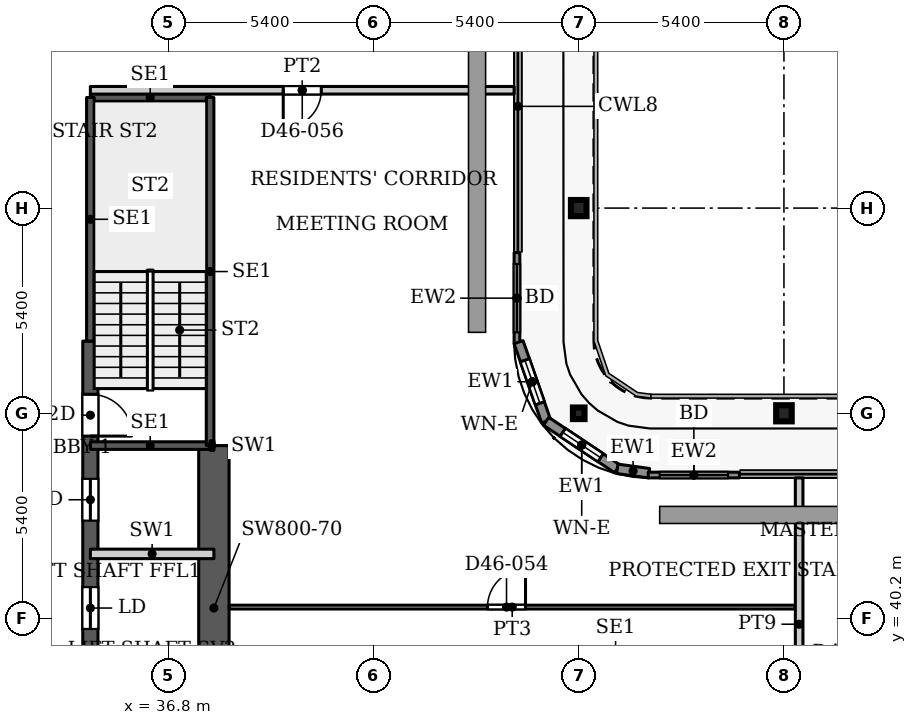
"""IFC4 building model, lengths in metres.
Left out: names, types, materials, properties, quantities, classifications, styles, units other than length and angle.
Written with IfcOpenShell. Run it as: python <this file> out.ifc"""

import sys

from ifc_helpers import new_model, si_unit, direction, frame, frame_2d, origin, origin_2d, place, context, subcontext, project, spatial, rectangle, hollow_rectangle, i_section, extrude, source, transform, mapped, element, fill, save


model = new_model("IFC4")
c1 = context("Model", 3, precision=1e-05, world=origin(), true_north=direction((0.0, 1.0)))
c2 = subcontext(c1, "Body", "Model", "MODEL_VIEW")
j1 = project(units=[si_unit("LENGTHUNIT", "METRE"), si_unit("PLANEANGLEUNIT", "RADIAN")], contexts=[c1])
p1 = place(None, origin())
s1 = spatial("IfcSite", under=j1, at=p1, CompositionType="ELEMENT")
p2 = place(p1, origin())
s2 = spatial("IfcBuilding", under=s1, at=p2, CompositionType="ELEMENT")
p3 = place(p2, frame((0.0, 0.0, 199.4)))
s3 = spatial("IfcBuildingStorey", under=s2, at=p3, CompositionType="ELEMENT", Elevation=199.4)
for number, where, z_axis, x_axis in (
    (1, (53.0, 45.6, 0.0), (0.0, 0.0, 1.0), (1.0, 0.0, 0.0)),
    (2, (47.6, 51.0, 0.0), (0.0, 0.0, 1.0), (1.0, 0.0, 0.0)),
):
    element("IfcColumn", number, at=place(p3, frame(where, z_axis=z_axis, x_axis=x_axis)), inside=s3, PredefinedType="COLUMN", context=c2, shape_type="SweptSolid", body=[
        extrude(i_section(OverallWidth=0.409, OverallDepth=0.425, WebThickness=0.033, FlangeThickness=0.052, FilletRadius=0.013, at=origin_2d()), origin(), (0.0, 0.0, 1.0), 3.9),
    ])
p4 = place(p3, frame((47.6, 45.6, 0.0), z_axis=(0.0, 0.0, 1.0), x_axis=(1.0, 0.0, 0.0)))
e3 = element("IfcColumn", 3, at=p4, inside=s3, PredefinedType="COLUMN", context=c2, shape_type="SweptSolid", body=[
    extrude(hollow_rectangle(XDim=0.305, YDim=0.305, WallThickness=0.016, InnerFilletRadius=0.016, OuterFilletRadius=0.032, at=origin_2d()), origin(), (0.0, 0.0, 1.0), 3.9),
])
p5 = place(p3, frame((34.75, 29.05, 0.0), z_axis=(0.0, 0.0, 1.0), x_axis=(0.0, 1.0, 0.0)))
e4 = element("IfcWall", 4, at=p5, inside=s3, PredefinedType="SHEAR", context=c2, shape_type="SweptSolid", body=[
    extrude(rectangle(XDim=18.45, YDim=0.4, at=frame_2d((9.225, 0.0))), origin(), (0.0, 0.0, 1.0), 3.9),
])
p6 = place(p5, frame((8.025, 0.0, 0.0)))
e5 = element("IfcOpeningElement", 5, at=p6, cuts=e4, PredefinedType="OPENING", context=c2, shape_type="SweptSolid", body=[
    extrude(rectangle(XDim=1.1, YDim=2.2, at=frame_2d((0.55, 1.1))), frame((0.0, 0.21, 0.0), z_axis=(0.0, -1.0, 0.0), x_axis=(1.0, 0.0, 0.0)), (0.0, 0.0, 1.0), 0.42),
])
p7 = place(p5, frame((10.875, 0.0, 0.0)))
e6 = element("IfcOpeningElement", 6, at=p7, cuts=e4, PredefinedType="OPENING", context=c2, shape_type="SweptSolid", body=[
    extrude(rectangle(XDim=1.1, YDim=2.2, at=frame_2d((0.55, 1.1))), frame((0.0, 0.21, 0.0), z_axis=(0.0, -1.0, 0.0), x_axis=(1.0, 0.0, 0.0)), (0.0, 0.0, 1.0), 0.42),
])
p8 = place(p5, frame((13.725, 0.0, 0.0)))
e7 = element("IfcOpeningElement", 7, at=p8, cuts=e4, PredefinedType="OPENING", context=c2, shape_type="SweptSolid", body=[
    extrude(rectangle(XDim=1.1, YDim=2.2, at=frame_2d((0.55, 1.1))), frame((0.0, 0.21, 0.0), z_axis=(0.0, -1.0, 0.0), x_axis=(1.0, 0.0, 0.0)), (0.0, 0.0, 1.0), 0.42),
])
p9 = place(p5, frame((15.95, 0.0, 0.0)))
e8 = element("IfcOpeningElement", 8, at=p9, cuts=e4, PredefinedType="OPENING", context=c2, shape_type="SweptSolid", body=[
    extrude(rectangle(XDim=1.1, YDim=2.2, at=frame_2d((0.55, 1.1))), frame((0.0, 0.21, 0.0), z_axis=(0.0, -1.0, 0.0), x_axis=(1.0, 0.0, 0.0)), (0.0, 0.0, 1.0), 0.42),
])
p10 = place(p3, frame((38.0, 36.2, 0.0), z_axis=(0.0, 0.0, 1.0), x_axis=(0.0, 1.0, 0.0)))
e9 = element("IfcWall", 9, at=p10, inside=s3, PredefinedType="SHEAR", context=c2, shape_type="SweptSolid", body=[
    extrude(rectangle(XDim=8.55, YDim=0.8, at=frame_2d((4.275, 0.0))), origin(), (0.0, 0.0, 1.0), 3.9),
])
p11 = place(p3, frame((45.975, 49.83, 0.0), z_axis=(0.0, 0.0, 1.0), x_axis=(0.0, -1.0, 0.0)))
e10 = element("IfcWall", 10, at=p11, inside=s3, PredefinedType="SOLIDWALL", context=c2, shape_type="SweptSolid", body=[
    extrude(rectangle(XDim=2.4, YDim=0.15, at=frame_2d((1.2, 0.0))), origin(), (0.0, 0.0, 1.0), 3.75),
])
p12 = place(p11, frame((0.3, 0.0, 0.0)))
e11 = element("IfcOpeningElement", 11, at=p12, cuts=e10, PredefinedType="OPENING", context=c2, shape_type="SweptSolid", body=[
    extrude(rectangle(XDim=1.8, YDim=2.4, at=frame_2d((0.9, 1.2))), frame((0.0, 0.085, 0.0), z_axis=(0.0, -1.0, 0.0), x_axis=(1.0, 0.0, 0.0)), (0.0, 0.0, 1.0), 0.17),
])
p13 = place(p3, frame((46.018, 47.471, 0.0), z_axis=(0.0, 0.0, 1.0), x_axis=(0.328791208903, -0.944402637093, 0.0)))
e12 = element("IfcWall", 12, at=p13, inside=s3, PredefinedType="SOLIDWALL", context=c2, shape_type="SweptSolid", body=[
    extrude(rectangle(XDim=2.205, YDim=0.25, at=frame_2d((1.102, 0.0))), origin(), (0.0, 0.0, 1.0), 3.75),
])
p14 = place(p13, frame((0.503, 0.0, 0.6)))
e13 = element("IfcOpeningElement", 13, at=p14, cuts=e12, PredefinedType="OPENING", context=c2, shape_type="SweptSolid", body=[
    extrude(rectangle(XDim=1.2, YDim=2.1, at=frame_2d((0.6, 1.05))), frame((0.0, 0.135, 0.0), z_axis=(0.0, -1.0, 0.0), x_axis=(1.0, 0.0, 0.0)), (0.0, 0.0, 1.0), 0.27),
])
p15 = place(p3, frame((46.743, 45.389, 0.0), z_axis=(0.0, 0.0, 1.0), x_axis=(0.831449265529, -0.555600682912, 0.0)))
e14 = element("IfcWall", 14, at=p15, inside=s3, PredefinedType="SOLIDWALL", context=c2, shape_type="SweptSolid", body=[
    extrude(rectangle(XDim=2.251, YDim=0.25, at=frame_2d((1.126, 0.0))), origin(), (0.0, 0.0, 1.0), 3.75),
])
p16 = place(p15, frame((0.525, 0.0, 0.6)))
e15 = element("IfcOpeningElement", 15, at=p16, cuts=e14, PredefinedType="OPENING", context=c2, shape_type="SweptSolid", body=[
    extrude(rectangle(XDim=1.2, YDim=2.1, at=frame_2d((0.6, 1.05))), frame((0.0, 0.135, 0.0), z_axis=(0.0, -1.0, 0.0), x_axis=(1.0, 0.0, 0.0)), (0.0, 0.0, 1.0), 0.27),
])
p17 = place(p3, frame((48.615, 44.138, 0.0), z_axis=(0.0, 0.0, 1.0), x_axis=(0.990741504246, -0.135761819977, 0.0)))
e16 = element("IfcWall", 16, at=p17, inside=s3, PredefinedType="SOLIDWALL", context=c2, shape_type="SweptSolid", body=[
    extrude(rectangle(XDim=0.84, YDim=0.25, at=frame_2d((0.42, 0.0))), origin(), (0.0, 0.0, 1.0), 3.75),
])
p18 = place(p3, frame((49.43, 43.975, 0.0), z_axis=(0.0, 0.0, 1.0), x_axis=(1.0, 0.0, 0.0)))
e17 = element("IfcWall", 17, at=p18, inside=s3, PredefinedType="SOLIDWALL", context=c2, shape_type="SweptSolid", body=[
    extrude(rectangle(XDim=2.4, YDim=0.15, at=frame_2d((1.2, 0.0))), origin(), (0.0, 0.0, 1.0), 3.75),
])
p19 = place(p18, frame((0.3, 0.0, 0.0)))
e18 = element("IfcOpeningElement", 18, at=p19, cuts=e17, PredefinedType="OPENING", context=c2, shape_type="SweptSolid", body=[
    extrude(rectangle(XDim=1.8, YDim=2.4, at=frame_2d((0.9, 1.2))), frame((0.0, 0.085, 0.0), z_axis=(0.0, -1.0, 0.0), x_axis=(1.0, 0.0, 0.0)), (0.0, 0.0, 1.0), 0.17),
])
for number, where, z_axis, x_axis in (
    (19, (34.75, 44.75, 0.0), (0.0, 0.0, 1.0), (1.0, 0.0, 0.0)),
    (20, (34.75, 53.91, 0.0), (0.0, 0.0, 1.0), (1.0, 0.0, 0.0)),
):
    element("IfcWall", number, at=place(p3, frame(where, z_axis=z_axis, x_axis=x_axis)), inside=s3, PredefinedType="SHEAR", context=c2, shape_type="SweptSolid", body=[
        extrude(rectangle(XDim=3.15, YDim=0.2, at=frame_2d((1.575, 0.0))), origin(), (0.0, 0.0, 1.0), 3.9),
    ])
p20 = place(p3, frame((34.75, 47.5, 0.0), z_axis=(0.0, 0.0, 1.0), x_axis=(0.0, 1.0, 0.0)))
e21 = element("IfcWall", 21, at=p20, inside=s3, PredefinedType="SHEAR", context=c2, shape_type="SweptSolid", body=[
    extrude(rectangle(XDim=6.41, YDim=0.2, at=frame_2d((3.205, 0.0))), origin(), (0.0, 0.0, 1.0), 3.9),
])
p21 = place(p3, frame((37.9, 44.75, 0.0), z_axis=(0.0, 0.0, 1.0), x_axis=(0.0, 1.0, 0.0)))
e22 = element("IfcWall", 22, at=p21, inside=s3, PredefinedType="SHEAR", context=c2, shape_type="SweptSolid", body=[
    extrude(rectangle(XDim=9.16, YDim=0.2, at=frame_2d((4.58, 0.0))), origin(), (0.0, 0.0, 1.0), 3.9),
])
p22 = place(p3, frame((34.75, 41.9, 0.0), z_axis=(0.0, 0.0, 1.0), x_axis=(1.0, 0.0, 0.0)))
e23 = element("IfcWall", 23, at=p22, inside=s3, PredefinedType="PARTITIONING", context=c2, shape_type="SweptSolid", body=[
    extrude(rectangle(XDim=3.25, YDim=0.25, at=frame_2d((1.625, 0.0))), origin(), (0.0, 0.0, 1.0), 3.9),
])
p23 = place(p3, frame((37.9, 44.75, 0.0), z_axis=(0.0, 0.0, 1.0), x_axis=(1.0, 0.0, 0.0)))
e24 = element("IfcWall", 24, at=p23, inside=s3, PredefinedType="PARTITIONING", context=c2, shape_type="SweptSolid", body=[
    extrude(rectangle(XDim=0.1, YDim=0.25, at=frame_2d((0.05, 0.0))), origin(), (0.0, 0.0, 1.0), 3.9),
])
p24 = place(p3, frame((34.75, 54.1, 0.0), z_axis=(0.0, 0.0, 1.0), x_axis=(1.0, 0.0, 0.0)))
e25 = element("IfcWall", 25, at=p24, inside=s3, PredefinedType="PARTITIONING", context=c2, shape_type="SweptSolid", body=[
    extrude(rectangle(XDim=11.15, YDim=0.2, at=frame_2d((5.575, 0.0))), origin(), (0.0, 0.0, 1.0), 3.6),
])
p25 = place(p24, frame((5.075, 0.0, 0.0)))
e26 = element("IfcOpeningElement", 26, at=p25, cuts=e25, PredefinedType="OPENING", context=c2, shape_type="SweptSolid", body=[
    extrude(rectangle(XDim=1.0, YDim=2.1, at=frame_2d((0.5, 1.05))), frame((0.0, 0.11, 0.0), z_axis=(0.0, -1.0, 0.0), x_axis=(1.0, 0.0, 0.0)), (0.0, 0.0, 1.0), 0.22),
])
p26 = place(p3, frame((38.399, 40.5, 0.0), z_axis=(0.0, 0.0, 1.0), x_axis=(1.0, 0.0, 0.0)))
e27 = element("IfcWall", 27, at=p26, inside=s3, PredefinedType="PARTITIONING", context=c2, shape_type="SweptSolid", body=[
    extrude(rectangle(XDim=14.901, YDim=0.1, at=frame_2d((7.451, 0.0))), origin(), (0.0, 0.0, 1.0), 3.6),
])
p27 = place(p26, frame((6.801, 0.0, 0.0)))
e28 = element("IfcOpeningElement", 28, at=p27, cuts=e27, PredefinedType="OPENING", context=c2, shape_type="SweptSolid", body=[
    extrude(rectangle(XDim=1.0, YDim=2.1, at=frame_2d((0.5, 1.05))), frame((0.0, 0.06, 0.0), z_axis=(0.0, -1.0, 0.0), x_axis=(1.0, 0.0, 0.0)), (0.0, 0.0, 1.0), 0.12),
])
p28 = place(p3, frame((53.4, 36.199, 0.0), z_axis=(0.0, 0.0, 1.0), x_axis=(0.0, 1.0, 0.0)))
e29 = element("IfcWall", 29, at=p28, inside=s3, PredefinedType="PARTITIONING", context=c2, shape_type="SweptSolid", body=[
    extrude(rectangle(XDim=7.701, YDim=0.2, at=frame_2d((3.851, 0.0))), origin(), (0.0, 0.0, 1.0), 3.6),
])
m1 = source(origin(), c2, "Body", "SweptSolid", [
    extrude(rectangle(XDim=1.8, YDim=2.4, at=frame_2d((0.9, 1.2))), frame((0.0, 0.025, 0.0), z_axis=(0.0, -1.0, 0.0), x_axis=(1.0, 0.0, 0.0)), (0.0, 0.0, 1.0), 0.05),
])
p29 = place(p12, origin())
e30 = element("IfcDoor", 30, at=p29, inside=s3, OperationType="SLIDING_TO_LEFT", PredefinedType="DOOR", context=c2, shape_type="MappedRepresentation", body=[
    mapped(m1, transform((0.0, 0.0, 0.0), x_axis=(1.0, 0.0, 0.0), y_axis=(0.0, 1.0, 0.0), z_axis=(0.0, 0.0, 1.0), scale=1.0)),
])
fill(e11, e30)
m2 = source(origin(), c2, "Body", "SweptSolid", [
    extrude(rectangle(XDim=1.2, YDim=2.1, at=frame_2d((0.6, 1.05))), frame((0.0, 0.03, 0.0), z_axis=(0.0, -1.0, 0.0), x_axis=(1.0, 0.0, 0.0)), (0.0, 0.0, 1.0), 0.06),
])
p30 = place(p14, origin())
e31 = element("IfcWindow", 31, at=p30, inside=s3, PartitioningType="SINGLE_PANEL", PredefinedType="WINDOW", context=c2, shape_type="MappedRepresentation", body=[
    mapped(m2, transform((0.0, 0.0, 0.0), x_axis=(1.0, 0.0, 0.0), y_axis=(0.0, 1.0, 0.0), z_axis=(0.0, 0.0, 1.0), scale=1.0)),
])
fill(e13, e31)
p31 = place(p16, origin())
e32 = element("IfcWindow", 32, at=p31, inside=s3, PartitioningType="SINGLE_PANEL", PredefinedType="WINDOW", context=c2, shape_type="MappedRepresentation", body=[
    mapped(m2, transform((0.0, 0.0, 0.0), x_axis=(1.0, 0.0, 0.0), y_axis=(0.0, 1.0, 0.0), z_axis=(0.0, 0.0, 1.0), scale=1.0)),
])
fill(e15, e32)
p32 = place(p19, origin())
e33 = element("IfcDoor", 33, at=p32, inside=s3, OperationType="SLIDING_TO_LEFT", PredefinedType="DOOR", context=c2, shape_type="MappedRepresentation", body=[
    mapped(m1, transform((0.0, 0.0, 0.0), x_axis=(1.0, 0.0, 0.0), y_axis=(0.0, 1.0, 0.0), z_axis=(0.0, 0.0, 1.0), scale=1.0)),
])
fill(e18, e33)
m3 = source(origin(), c2, "Body", "SweptSolid", [
    extrude(rectangle(XDim=1.1, YDim=2.2, at=frame_2d((0.55, 1.1))), frame((0.0, 0.025, 0.0), z_axis=(0.0, -1.0, 0.0), x_axis=(1.0, 0.0, 0.0)), (0.0, 0.0, 1.0), 0.05),
])
p33 = place(p7, origin())
e34 = element("IfcDoor", 34, at=p33, inside=s3, OperationType="SLIDING_TO_LEFT", PredefinedType="DOOR", context=c2, shape_type="MappedRepresentation", body=[
    mapped(m3, transform((0.0, 0.0, 0.0), x_axis=(1.0, 0.0, 0.0), y_axis=(0.0, 1.0, 0.0), z_axis=(0.0, 0.0, 1.0), scale=1.0)),
])
fill(e6, e34)
p34 = place(p8, origin())
e35 = element("IfcDoor", 35, at=p34, inside=s3, OperationType="SLIDING_TO_LEFT", PredefinedType="DOOR", context=c2, shape_type="MappedRepresentation", body=[
    mapped(m3, transform((0.0, 0.0, 0.0), x_axis=(1.0, 0.0, 0.0), y_axis=(0.0, 1.0, 0.0), z_axis=(0.0, 0.0, 1.0), scale=1.0)),
])
fill(e7, e35)
m4 = source(origin(), c2, "Body", "SweptSolid", [
    extrude(rectangle(XDim=1.1, YDim=2.2, at=frame_2d((0.55, 1.1))), frame((0.0, 0.025, 0.0), z_axis=(0.0, -1.0, 0.0), x_axis=(1.0, 0.0, 0.0)), (0.0, 0.0, 1.0), 0.05),
])
p35 = place(p9, origin())
e36 = element("IfcDoor", 36, at=p35, inside=s3, OperationType="SINGLE_SWING_RIGHT", PredefinedType="DOOR", context=c2, shape_type="MappedRepresentation", body=[
    mapped(m4, transform((0.0, 0.0, 0.0), x_axis=(1.0, 0.0, 0.0), y_axis=(0.0, 1.0, 0.0), z_axis=(0.0, 0.0, 1.0), scale=1.0)),
])
fill(e8, e36)
m5 = source(origin(), c2, "Body", "SweptSolid", [
    extrude(rectangle(XDim=1.0, YDim=2.1, at=frame_2d((0.5, 1.05))), frame((0.0, 0.025, 0.0), z_axis=(0.0, -1.0, 0.0), x_axis=(1.0, 0.0, 0.0)), (0.0, 0.0, 1.0), 0.05),
])
p36 = place(p27, origin())
e37 = element("IfcDoor", 37, at=p36, inside=s3, OperationType="SINGLE_SWING_LEFT", PredefinedType="DOOR", context=c2, shape_type="MappedRepresentation", body=[
    mapped(m5, transform((0.0, 0.0, 0.0), x_axis=(1.0, 0.0, 0.0), y_axis=(0.0, 1.0, 0.0), z_axis=(0.0, 0.0, 1.0), scale=1.0)),
])
fill(e28, e37)
m6 = source(origin(), c2, "Body", "SweptSolid", [
    extrude(rectangle(XDim=1.0, YDim=2.1, at=frame_2d((0.5, 1.05))), frame((0.0, 0.025, 0.0), z_axis=(0.0, -1.0, 0.0), x_axis=(1.0, 0.0, 0.0)), (0.0, 0.0, 1.0), 0.05),
])
p37 = place(p25, origin())
e38 = element("IfcDoor", 38, at=p37, inside=s3, OperationType="SINGLE_SWING_RIGHT", PredefinedType="DOOR", context=c2, shape_type="MappedRepresentation", body=[
    mapped(m6, transform((0.0, 0.0, 0.0), x_axis=(1.0, 0.0, 0.0), y_axis=(0.0, 1.0, 0.0), z_axis=(0.0, 0.0, 1.0), scale=1.0)),
])
fill(e26, e38)
save(model, sys.argv[1])
